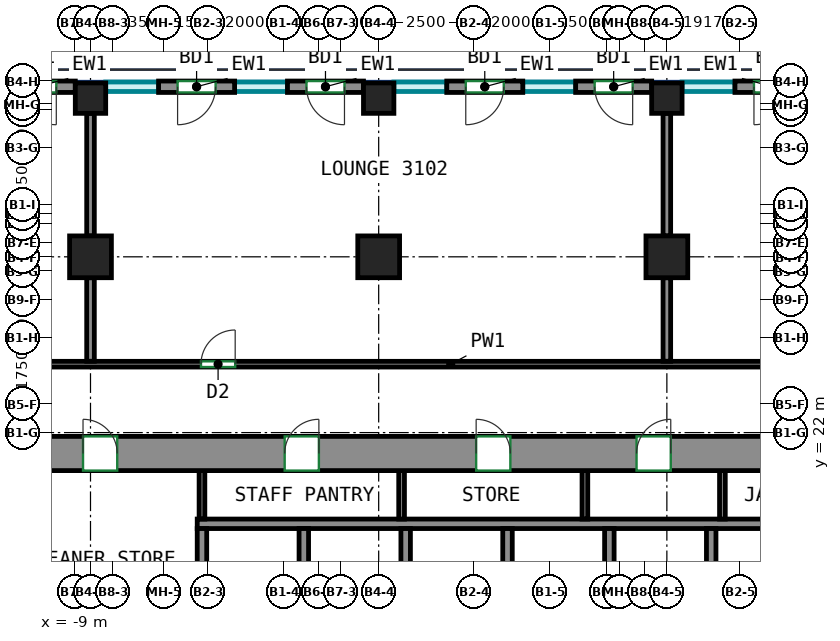
"""IFC4 building model, lengths in metres.
Left out: names, types, materials, properties, quantities, classifications, styles, units other than length and angle.
Written with IfcOpenShell. Run it as: python <this file> out.ifc"""

import sys

from ifc_helpers import new_model, si_unit, direction, frame, frame_2d, origin, origin_2d, place, context, subcontext, project, spatial, rectangle, extrude, source, transform, mapped, element, fill, save


model = new_model("IFC4")
c1 = context("Model", 3, precision=1e-05, world=origin(), true_north=direction((0.0, 1.0)))
c2 = subcontext(c1, "Body", "Model", "MODEL_VIEW")
j1 = project(units=[si_unit("LENGTHUNIT", "METRE"), si_unit("PLANEANGLEUNIT", "RADIAN")], contexts=[c1])
p1 = place(None, origin())
s1 = spatial("IfcSite", under=j1, at=p1, CompositionType="ELEMENT")
p2 = place(p1, origin())
s2 = spatial("IfcBuilding", under=s1, at=p2, CompositionType="ELEMENT")
p3 = place(p2, frame((0.0, 0.0, 138.5)))
s3 = spatial("IfcBuildingStorey", under=s2, at=p3, CompositionType="ELEMENT", Elevation=138.5)
m1 = source(origin(), c2, "Body", "SweptSolid", [
    extrude(rectangle(XDim=1.1, YDim=1.1, at=origin_2d()), origin(), (0.0, 0.0, 1.0), 5.12),
])
p4 = place(p3, frame((-8.583, 26.625, 0.0), z_axis=(0.0, 0.0, 1.0), x_axis=(1.0, 0.0, 0.0)))
e1 = element("IfcColumn", 1, at=p4, inside=s3, PredefinedType="COLUMN", context=c2, shape_type="MappedRepresentation", body=[
    mapped(m1, transform((0.0, 0.0, 0.0))),
])
m2 = source(origin(), c2, "Body", "SweptSolid", [
    extrude(rectangle(XDim=0.8, YDim=0.8, at=origin_2d()), origin(), (0.0, 0.0, 1.0), 5.12),
])
p5 = place(p3, frame((-8.583, 30.8, 0.0), z_axis=(0.0, 0.0, 1.0), x_axis=(1.0, 0.0, 0.0)))
e2 = element("IfcColumn", 2, at=p5, inside=s3, PredefinedType="COLUMN", context=c2, shape_type="MappedRepresentation", body=[
    mapped(m2, transform((0.0, 0.0, 0.0))),
])
p6 = place(p3, frame((-1.0, 26.625, 0.0), z_axis=(0.0, 0.0, 1.0), x_axis=(1.0, 0.0, 0.0)))
e3 = element("IfcColumn", 3, at=p6, inside=s3, PredefinedType="COLUMN", context=c2, shape_type="MappedRepresentation", body=[
    mapped(m1, transform((0.0, 0.0, 0.0))),
])
p7 = place(p3, frame((-1.0, 30.8, 0.0), z_axis=(0.0, 0.0, 1.0), x_axis=(1.0, 0.0, 0.0)))
e4 = element("IfcColumn", 4, at=p7, inside=s3, PredefinedType="COLUMN", context=c2, shape_type="MappedRepresentation", body=[
    mapped(m2, transform((0.0, 0.0, 0.0))),
])
p8 = place(p3, frame((6.583, 26.625, 0.0), z_axis=(0.0, 0.0, 1.0), x_axis=(1.0, 0.0, 0.0)))
e5 = element("IfcColumn", 5, at=p8, inside=s3, PredefinedType="COLUMN", context=c2, shape_type="MappedRepresentation", body=[
    mapped(m1, transform((0.0, 0.0, 0.0))),
])
p9 = place(p3, frame((6.583, 30.8, 0.0), z_axis=(0.0, 0.0, 1.0), x_axis=(1.0, 0.0, 0.0)))
e6 = element("IfcColumn", 6, at=p9, inside=s3, PredefinedType="COLUMN", context=c2, shape_type="MappedRepresentation", body=[
    mapped(m2, transform((0.0, 0.0, 0.0))),
])
m3 = source(origin(), c2, "Body", "SweptSolid", [
    extrude(rectangle(XDim=33.9, YDim=0.9, at=frame_2d((16.95, 0.0))), origin(), (0.0, 0.0, 1.0), 5.12),
])
p10 = place(p3, frame((-15.9, 21.45, 0.0), z_axis=(0.0, 0.0, 1.0), x_axis=(1.0, 0.0, 0.0)))
e7 = element("IfcWall", 7, at=p10, inside=s3, PredefinedType="SHEAR", context=c2, shape_type="MappedRepresentation", body=[
    mapped(m3, transform((0.0, 0.0, 0.0))),
])
p11 = place(p10, frame((7.12, 0.0, 0.0)))
e8 = element("IfcOpeningElement", 8, at=p11, cuts=e7, PredefinedType="OPENING", context=c2, shape_type="SweptSolid", body=[
    extrude(rectangle(XDim=0.9, YDim=2.1, at=frame_2d((0.45, 1.05))), frame((0.0, 0.46, 0.0), z_axis=(0.0, -1.0, 0.0), x_axis=(1.0, 0.0, 0.0)), (0.0, 0.0, 1.0), 0.92),
])
p12 = place(p10, frame((12.427, 0.0, 0.0)))
e9 = element("IfcOpeningElement", 9, at=p12, cuts=e7, PredefinedType="OPENING", context=c2, shape_type="SweptSolid", body=[
    extrude(rectangle(XDim=0.9, YDim=2.1, at=frame_2d((0.45, 1.05))), frame((0.0, 0.46, 0.0), z_axis=(0.0, -1.0, 0.0), x_axis=(1.0, 0.0, 0.0)), (0.0, 0.0, 1.0), 0.92),
])
p13 = place(p10, frame((17.465, 0.0, 0.0)))
e10 = element("IfcOpeningElement", 10, at=p13, cuts=e7, PredefinedType="OPENING", context=c2, shape_type="SweptSolid", body=[
    extrude(rectangle(XDim=0.9, YDim=2.1, at=frame_2d((0.45, 1.05))), frame((0.0, 0.46, 0.0), z_axis=(0.0, -1.0, 0.0), x_axis=(1.0, 0.0, 0.0)), (0.0, 0.0, 1.0), 0.92),
])
p14 = place(p10, frame((21.686, 0.0, 0.0)))
e11 = element("IfcOpeningElement", 11, at=p14, cuts=e7, PredefinedType="OPENING", context=c2, shape_type="SweptSolid", body=[
    extrude(rectangle(XDim=0.9, YDim=2.1, at=frame_2d((0.45, 1.05))), frame((0.0, 0.46, 0.0), z_axis=(0.0, -1.0, 0.0), x_axis=(1.0, 0.0, 0.0)), (0.0, 0.0, 1.0), 0.92),
])
p15 = place(p10, frame((26.027, 0.0, 0.0)))
e12 = element("IfcOpeningElement", 12, at=p15, cuts=e7, PredefinedType="OPENING", context=c2, shape_type="SweptSolid", body=[
    extrude(rectangle(XDim=0.9, YDim=2.1, at=frame_2d((0.45, 1.05))), frame((0.0, 0.46, 0.0), z_axis=(0.0, -1.0, 0.0), x_axis=(1.0, 0.0, 0.0)), (0.0, 0.0, 1.0), 0.92),
])
p16 = place(p10, frame((2.425, 0.0, 0.0)))
e13 = element("IfcOpeningElement", 13, at=p16, cuts=e7, PredefinedType="OPENING", context=c2, shape_type="SweptSolid", body=[
    extrude(rectangle(XDim=0.9, YDim=2.1, at=frame_2d((0.45, 1.05))), frame((0.0, 0.46, 0.0), z_axis=(0.0, -1.0, 0.0), x_axis=(1.0, 0.0, 0.0)), (0.0, 0.0, 1.0), 0.92),
])
p17 = place(p10, frame((30.575, 0.0, 0.0)))
e14 = element("IfcOpeningElement", 14, at=p17, cuts=e7, PredefinedType="OPENING", context=c2, shape_type="SweptSolid", body=[
    extrude(rectangle(XDim=0.9, YDim=2.1, at=frame_2d((0.45, 1.05))), frame((0.0, 0.46, 0.0), z_axis=(0.0, -1.0, 0.0), x_axis=(1.0, 0.0, 0.0)), (0.0, 0.0, 1.0), 0.92),
])
m4 = source(origin(), c2, "Body", "SweptSolid", [
    extrude(rectangle(XDim=2.0, YDim=0.3, at=frame_2d((1.0, 0.0))), origin(), (0.0, 0.0, 1.0), 5.12),
])
p18 = place(p3, frame((10.375, 31.1, 0.0), z_axis=(0.0, 0.0, 1.0), x_axis=(-1.0, 0.0, 0.0)))
e15 = element("IfcWall", 15, at=p18, inside=s3, PredefinedType="SOLIDWALL", context=c2, shape_type="MappedRepresentation", body=[
    mapped(m4, transform((0.0, 0.0, 0.0))),
])
p19 = place(p18, frame((0.5, 0.0, 0.0)))
e16 = element("IfcOpeningElement", 16, at=p19, cuts=e15, PredefinedType="OPENING", context=c2, shape_type="SweptSolid", body=[
    extrude(rectangle(XDim=1.0, YDim=2.1, at=frame_2d((0.5, 1.05))), frame((0.0, 0.16, 0.0), z_axis=(0.0, -1.0, 0.0), x_axis=(1.0, 0.0, 0.0)), (0.0, 0.0, 1.0), 0.32),
])
p20 = place(p3, frame((6.183, 31.1, 0.0), z_axis=(0.0, 0.0, 1.0), x_axis=(-1.0, 0.0, 0.0)))
e17 = element("IfcWall", 17, at=p20, inside=s3, PredefinedType="SOLIDWALL", context=c2, shape_type="MappedRepresentation", body=[
    mapped(m4, transform((0.0, 0.0, 0.0))),
])
p21 = place(p20, frame((0.5, 0.0, 0.0)))
e18 = element("IfcOpeningElement", 18, at=p21, cuts=e17, PredefinedType="OPENING", context=c2, shape_type="SweptSolid", body=[
    extrude(rectangle(XDim=1.0, YDim=2.1, at=frame_2d((0.5, 1.05))), frame((0.0, 0.16, 0.0), z_axis=(0.0, -1.0, 0.0), x_axis=(1.0, 0.0, 0.0)), (0.0, 0.0, 1.0), 0.32),
])
p22 = place(p3, frame((2.792, 31.1, 0.0), z_axis=(0.0, 0.0, 1.0), x_axis=(-1.0, 0.0, 0.0)))
e19 = element("IfcWall", 19, at=p22, inside=s3, PredefinedType="SOLIDWALL", context=c2, shape_type="MappedRepresentation", body=[
    mapped(m4, transform((0.0, 0.0, 0.0))),
])
p23 = place(p22, frame((0.5, 0.0, 0.0)))
e20 = element("IfcOpeningElement", 20, at=p23, cuts=e19, PredefinedType="OPENING", context=c2, shape_type="SweptSolid", body=[
    extrude(rectangle(XDim=1.0, YDim=2.1, at=frame_2d((0.5, 1.05))), frame((0.0, 0.16, 0.0), z_axis=(0.0, -1.0, 0.0), x_axis=(1.0, 0.0, 0.0)), (0.0, 0.0, 1.0), 0.32),
])
p24 = place(p3, frame((-1.4, 31.1, 0.0), z_axis=(0.0, 0.0, 1.0), x_axis=(-1.0, 0.0, 0.0)))
e21 = element("IfcWall", 21, at=p24, inside=s3, PredefinedType="SOLIDWALL", context=c2, shape_type="MappedRepresentation", body=[
    mapped(m4, transform((0.0, 0.0, 0.0))),
])
p25 = place(p24, frame((0.5, 0.0, 0.0)))
e22 = element("IfcOpeningElement", 22, at=p25, cuts=e21, PredefinedType="OPENING", context=c2, shape_type="SweptSolid", body=[
    extrude(rectangle(XDim=1.0, YDim=2.1, at=frame_2d((0.5, 1.05))), frame((0.0, 0.16, 0.0), z_axis=(0.0, -1.0, 0.0), x_axis=(1.0, 0.0, 0.0)), (0.0, 0.0, 1.0), 0.32),
])
p26 = place(p3, frame((-4.792, 31.1, 0.0), z_axis=(0.0, 0.0, 1.0), x_axis=(-1.0, 0.0, 0.0)))
e23 = element("IfcWall", 23, at=p26, inside=s3, PredefinedType="SOLIDWALL", context=c2, shape_type="MappedRepresentation", body=[
    mapped(m4, transform((0.0, 0.0, 0.0))),
])
p27 = place(p26, frame((0.5, 0.0, 0.0)))
e24 = element("IfcOpeningElement", 24, at=p27, cuts=e23, PredefinedType="OPENING", context=c2, shape_type="SweptSolid", body=[
    extrude(rectangle(XDim=1.0, YDim=2.1, at=frame_2d((0.5, 1.05))), frame((0.0, 0.16, 0.0), z_axis=(0.0, -1.0, 0.0), x_axis=(1.0, 0.0, 0.0)), (0.0, 0.0, 1.0), 0.32),
])
p28 = place(p3, frame((-8.983, 31.1, 0.0), z_axis=(0.0, 0.0, 1.0), x_axis=(-1.0, 0.0, 0.0)))
e25 = element("IfcWall", 25, at=p28, inside=s3, PredefinedType="SOLIDWALL", context=c2, shape_type="MappedRepresentation", body=[
    mapped(m4, transform((0.0, 0.0, 0.0))),
])
p29 = place(p28, frame((0.5, 0.0, 0.0)))
e26 = element("IfcOpeningElement", 26, at=p29, cuts=e25, PredefinedType="OPENING", context=c2, shape_type="SweptSolid", body=[
    extrude(rectangle(XDim=1.0, YDim=2.1, at=frame_2d((0.5, 1.05))), frame((0.0, 0.16, 0.0), z_axis=(0.0, -1.0, 0.0), x_axis=(1.0, 0.0, 0.0)), (0.0, 0.0, 1.0), 0.32),
])
m5 = source(origin(), c2, "Body", "SweptSolid", [
    extrude(rectangle(XDim=19.01, YDim=0.25, at=frame_2d((9.505, 0.0))), origin(), (0.0, 0.0, 1.0), 5.12),
])
p30 = place(p3, frame((-5.775, 19.6, 0.0), z_axis=(0.0, 0.0, 1.0), x_axis=(1.0, 0.0, 0.0)))
e27 = element("IfcWall", 27, at=p30, inside=s3, PredefinedType="PARTITIONING", context=c2, shape_type="MappedRepresentation", body=[
    mapped(m5, transform((0.0, 0.0, 0.0))),
])
m6 = source(origin(), c2, "Body", "SweptSolid", [
    extrude(rectangle(XDim=3.275, YDim=0.25, at=frame_2d((1.638, 0.0))), origin(), (0.0, 0.0, 1.0), 5.12),
])
for number, where, z_axis, x_axis in (
    (28, (2.39, 16.2, 0.0), (0.0, 0.0, 1.0), (0.0, 1.0, 0.0)),
    (29, (5.07, 16.2, 0.0), (0.0, 0.0, 1.0), (0.0, 1.0, 0.0)),
    (30, (7.75, 16.2, 0.0), (0.0, 0.0, 1.0), (0.0, 1.0, 0.0)),
    (31, (-0.29, 16.2, 0.0), (0.0, 0.0, 1.0), (0.0, 1.0, 0.0)),
    (32, (-2.97, 16.2, 0.0), (0.0, 0.0, 1.0), (0.0, 1.0, 0.0)),
    (33, (-5.65, 16.2, 0.0), (0.0, 0.0, 1.0), (0.0, 1.0, 0.0)),
):
    element("IfcWall", number, at=place(p3, frame(where, z_axis=z_axis, x_axis=x_axis)), inside=s3, PredefinedType="PARTITIONING", context=c2, shape_type="MappedRepresentation", body=[
        mapped(m6, transform((0.0, 0.0, 0.0))),
    ])
m7 = source(origin(), c2, "Body", "SweptSolid", [
    extrude(rectangle(XDim=1.275, YDim=0.15, at=frame_2d((0.637, 0.0))), origin(), (0.0, 0.0, 1.0), 5.12),
])
for number, where, z_axis, x_axis in (
    (34, (-5.65, 19.725, 0.0), (0.0, 0.0, 1.0), (0.0, 1.0, 0.0)),
    (35, (-0.397, 19.725, 0.0), (0.0, 0.0, 1.0), (0.0, 1.0, 0.0)),
    (36, (4.427, 19.725, 0.0), (0.0, 0.0, 1.0), (0.0, 1.0, 0.0)),
    (37, (8.045, 19.725, 0.0), (0.0, 0.0, 1.0), (0.0, 1.0, 0.0)),
):
    element("IfcWall", number, at=place(p3, frame(where, z_axis=z_axis, x_axis=x_axis)), inside=s3, PredefinedType="PARTITIONING", context=c2, shape_type="MappedRepresentation", body=[
        mapped(m7, transform((0.0, 0.0, 0.0))),
    ])
p31 = place(p3, frame((-20.059, 23.8, 0.0), z_axis=(0.0, 0.0, 1.0), x_axis=(1.0, 0.0, 0.0)))
e38 = element("IfcWall", 38, at=p31, inside=s3, PredefinedType="PARTITIONING", context=c2, shape_type="SweptSolid", body=[
    extrude(rectangle(XDim=41.909, YDim=0.15, at=frame_2d((20.955, 0.0))), origin(), (0.0, 0.0, 1.0), 5.12),
])
p32 = place(p31, frame((6.453, 0.0, 0.0)))
e39 = element("IfcOpeningElement", 39, at=p32, cuts=e38, PredefinedType="OPENING", context=c2, shape_type="SweptSolid", body=[
    extrude(rectangle(XDim=0.9, YDim=2.1, at=frame_2d((0.45, 1.05))), frame((0.0, 0.085, 0.0), z_axis=(0.0, -1.0, 0.0), x_axis=(1.0, 0.0, 0.0)), (0.0, 0.0, 1.0), 0.17),
])
p33 = place(p31, frame((14.383, 0.0, 0.0)))
e40 = element("IfcOpeningElement", 40, at=p33, cuts=e38, PredefinedType="OPENING", context=c2, shape_type="SweptSolid", body=[
    extrude(rectangle(XDim=0.9, YDim=2.1, at=frame_2d((0.45, 1.05))), frame((0.0, 0.085, 0.0), z_axis=(0.0, -1.0, 0.0), x_axis=(1.0, 0.0, 0.0)), (0.0, 0.0, 1.0), 0.17),
])
p34 = place(p31, frame((34.202, 0.0, 0.0)))
e41 = element("IfcOpeningElement", 41, at=p34, cuts=e38, PredefinedType="OPENING", context=c2, shape_type="SweptSolid", body=[
    extrude(rectangle(XDim=0.9, YDim=2.1, at=frame_2d((0.45, 1.05))), frame((0.0, 0.085, 0.0), z_axis=(0.0, -1.0, 0.0), x_axis=(1.0, 0.0, 0.0)), (0.0, 0.0, 1.0), 0.17),
])
p35 = place(p31, frame((40.409, 0.0, 0.0)))
e42 = element("IfcOpeningElement", 42, at=p35, cuts=e38, PredefinedType="OPENING", context=c2, shape_type="SweptSolid", body=[
    extrude(rectangle(XDim=0.9, YDim=2.1, at=frame_2d((0.45, 1.05))), frame((0.0, 0.085, 0.0), z_axis=(0.0, -1.0, 0.0), x_axis=(1.0, 0.0, 0.0)), (0.0, 0.0, 1.0), 0.17),
])
p36 = place(p3, frame((-8.583, 23.877, 0.0), z_axis=(0.0, 0.0, 1.0), x_axis=(0.0, 1.0, 0.0)))
e43 = element("IfcWall", 43, at=p36, inside=s3, PredefinedType="PARTITIONING", context=c2, shape_type="SweptSolid", body=[
    extrude(rectangle(XDim=2.198, YDim=0.2, at=frame_2d((1.099, 0.0))), origin(), (0.0, 0.0, 1.0), 5.12),
])
for number, where, z_axis, x_axis in (
    (44, (-8.583, 27.175, 0.0), (0.0, 0.0, 1.0), (0.0, 1.0, 0.0)),
    (45, (6.583, 27.175, 0.0), (0.0, 0.0, 1.0), (0.0, 1.0, 0.0)),
):
    element("IfcWall", number, at=place(p3, frame(where, z_axis=z_axis, x_axis=x_axis)), inside=s3, PredefinedType="PARTITIONING", context=c2, shape_type="SweptSolid", body=[
        extrude(rectangle(XDim=3.225, YDim=0.2, at=frame_2d((1.612, 0.0))), origin(), (0.0, 0.0, 1.0), 5.12),
    ])
p37 = place(p3, frame((6.583, 23.877, 0.0), z_axis=(0.0, 0.0, 1.0), x_axis=(0.0, 1.0, 0.0)))
e46 = element("IfcWall", 46, at=p37, inside=s3, PredefinedType="PARTITIONING", context=c2, shape_type="SweptSolid", body=[
    extrude(rectangle(XDim=2.198, YDim=0.2, at=frame_2d((1.099, 0.0))), origin(), (0.0, 0.0, 1.0), 5.12),
])
p38 = place(p19, origin())
e47 = element("IfcDoor", 47, at=p38, inside=s3, OperationType="SINGLE_SWING_RIGHT", PredefinedType="DOOR", context=c2, shape_type="SweptSolid", body=[
    extrude(rectangle(XDim=1.0, YDim=2.1, at=frame_2d((0.5, 1.05))), frame((0.0, 0.025, 0.0), z_axis=(0.0, -1.0, 0.0), x_axis=(1.0, 0.0, 0.0)), (0.0, 0.0, 1.0), 0.05),
])
fill(e16, e47)
p39 = place(p21, origin())
e48 = element("IfcDoor", 48, at=p39, inside=s3, OperationType="SINGLE_SWING_LEFT", PredefinedType="DOOR", context=c2, shape_type="SweptSolid", body=[
    extrude(rectangle(XDim=1.0, YDim=2.1, at=frame_2d((0.5, 1.05))), frame((0.0, 0.025, 0.0), z_axis=(0.0, -1.0, 0.0), x_axis=(1.0, 0.0, 0.0)), (0.0, 0.0, 1.0), 0.05),
])
fill(e18, e48)
p40 = place(p23, origin())
e49 = element("IfcDoor", 49, at=p40, inside=s3, OperationType="SINGLE_SWING_RIGHT", PredefinedType="DOOR", context=c2, shape_type="SweptSolid", body=[
    extrude(rectangle(XDim=1.0, YDim=2.1, at=frame_2d((0.5, 1.05))), frame((0.0, 0.025, 0.0), z_axis=(0.0, -1.0, 0.0), x_axis=(1.0, 0.0, 0.0)), (0.0, 0.0, 1.0), 0.05),
])
fill(e20, e49)
p41 = place(p25, origin())
e50 = element("IfcDoor", 50, at=p41, inside=s3, OperationType="SINGLE_SWING_LEFT", PredefinedType="DOOR", context=c2, shape_type="SweptSolid", body=[
    extrude(rectangle(XDim=1.0, YDim=2.1, at=frame_2d((0.5, 1.05))), frame((0.0, 0.025, 0.0), z_axis=(0.0, -1.0, 0.0), x_axis=(1.0, 0.0, 0.0)), (0.0, 0.0, 1.0), 0.05),
])
fill(e22, e50)
p42 = place(p27, origin())
e51 = element("IfcDoor", 51, at=p42, inside=s3, OperationType="SINGLE_SWING_RIGHT", PredefinedType="DOOR", context=c2, shape_type="SweptSolid", body=[
    extrude(rectangle(XDim=1.0, YDim=2.1, at=frame_2d((0.5, 1.05))), frame((0.0, 0.025, 0.0), z_axis=(0.0, -1.0, 0.0), x_axis=(1.0, 0.0, 0.0)), (0.0, 0.0, 1.0), 0.05),
])
fill(e24, e51)
p43 = place(p29, origin())
e52 = element("IfcDoor", 52, at=p43, inside=s3, OperationType="SINGLE_SWING_LEFT", PredefinedType="DOOR", context=c2, shape_type="SweptSolid", body=[
    extrude(rectangle(XDim=1.0, YDim=2.1, at=frame_2d((0.5, 1.05))), frame((0.0, 0.025, 0.0), z_axis=(0.0, -1.0, 0.0), x_axis=(1.0, 0.0, 0.0)), (0.0, 0.0, 1.0), 0.05),
])
fill(e26, e52)
p44 = place(p11, origin())
e53 = element("IfcDoor", 53, at=p44, inside=s3, OperationType="SINGLE_SWING_LEFT", PredefinedType="DOOR", context=c2, shape_type="SweptSolid", body=[
    extrude(rectangle(XDim=0.9, YDim=2.1, at=frame_2d((0.45, 1.05))), frame((0.0, -0.305, 0.0), z_axis=(0.0, -1.0, 0.0), x_axis=(1.0, 0.0, 0.0)), (0.0, 0.0, 1.0), 0.05),
])
fill(e8, e53)
p45 = place(p12, origin())
e54 = element("IfcDoor", 54, at=p45, inside=s3, OperationType="SINGLE_SWING_RIGHT", PredefinedType="DOOR", context=c2, shape_type="SweptSolid", body=[
    extrude(rectangle(XDim=0.9, YDim=2.1, at=frame_2d((0.45, 1.05))), frame((0.0, -0.305, 0.0), z_axis=(0.0, -1.0, 0.0), x_axis=(1.0, 0.0, 0.0)), (0.0, 0.0, 1.0), 0.05),
])
fill(e9, e54)
p46 = place(p13, origin())
e55 = element("IfcDoor", 55, at=p46, inside=s3, OperationType="SINGLE_SWING_LEFT", PredefinedType="DOOR", context=c2, shape_type="SweptSolid", body=[
    extrude(rectangle(XDim=0.9, YDim=2.1, at=frame_2d((0.45, 1.05))), frame((0.0, -0.305, 0.0), z_axis=(0.0, -1.0, 0.0), x_axis=(1.0, 0.0, 0.0)), (0.0, 0.0, 1.0), 0.05),
])
fill(e10, e55)
p47 = place(p14, origin())
e56 = element("IfcDoor", 56, at=p47, inside=s3, OperationType="SINGLE_SWING_RIGHT", PredefinedType="DOOR", context=c2, shape_type="SweptSolid", body=[
    extrude(rectangle(XDim=0.9, YDim=2.1, at=frame_2d((0.45, 1.05))), frame((0.0, -0.305, 0.0), z_axis=(0.0, -1.0, 0.0), x_axis=(1.0, 0.0, 0.0)), (0.0, 0.0, 1.0), 0.05),
])
fill(e11, e56)
p48 = place(p33, origin())
e57 = element("IfcDoor", 57, at=p48, inside=s3, OperationType="SINGLE_SWING_RIGHT", PredefinedType="DOOR", context=c2, shape_type="SweptSolid", body=[
    extrude(rectangle(XDim=0.9, YDim=2.1, at=frame_2d((0.45, 1.05))), frame((0.0, 0.025, 0.0), z_axis=(0.0, -1.0, 0.0), x_axis=(1.0, 0.0, 0.0)), (0.0, 0.0, 1.0), 0.05),
])
fill(e40, e57)
save(model, sys.argv[1])
